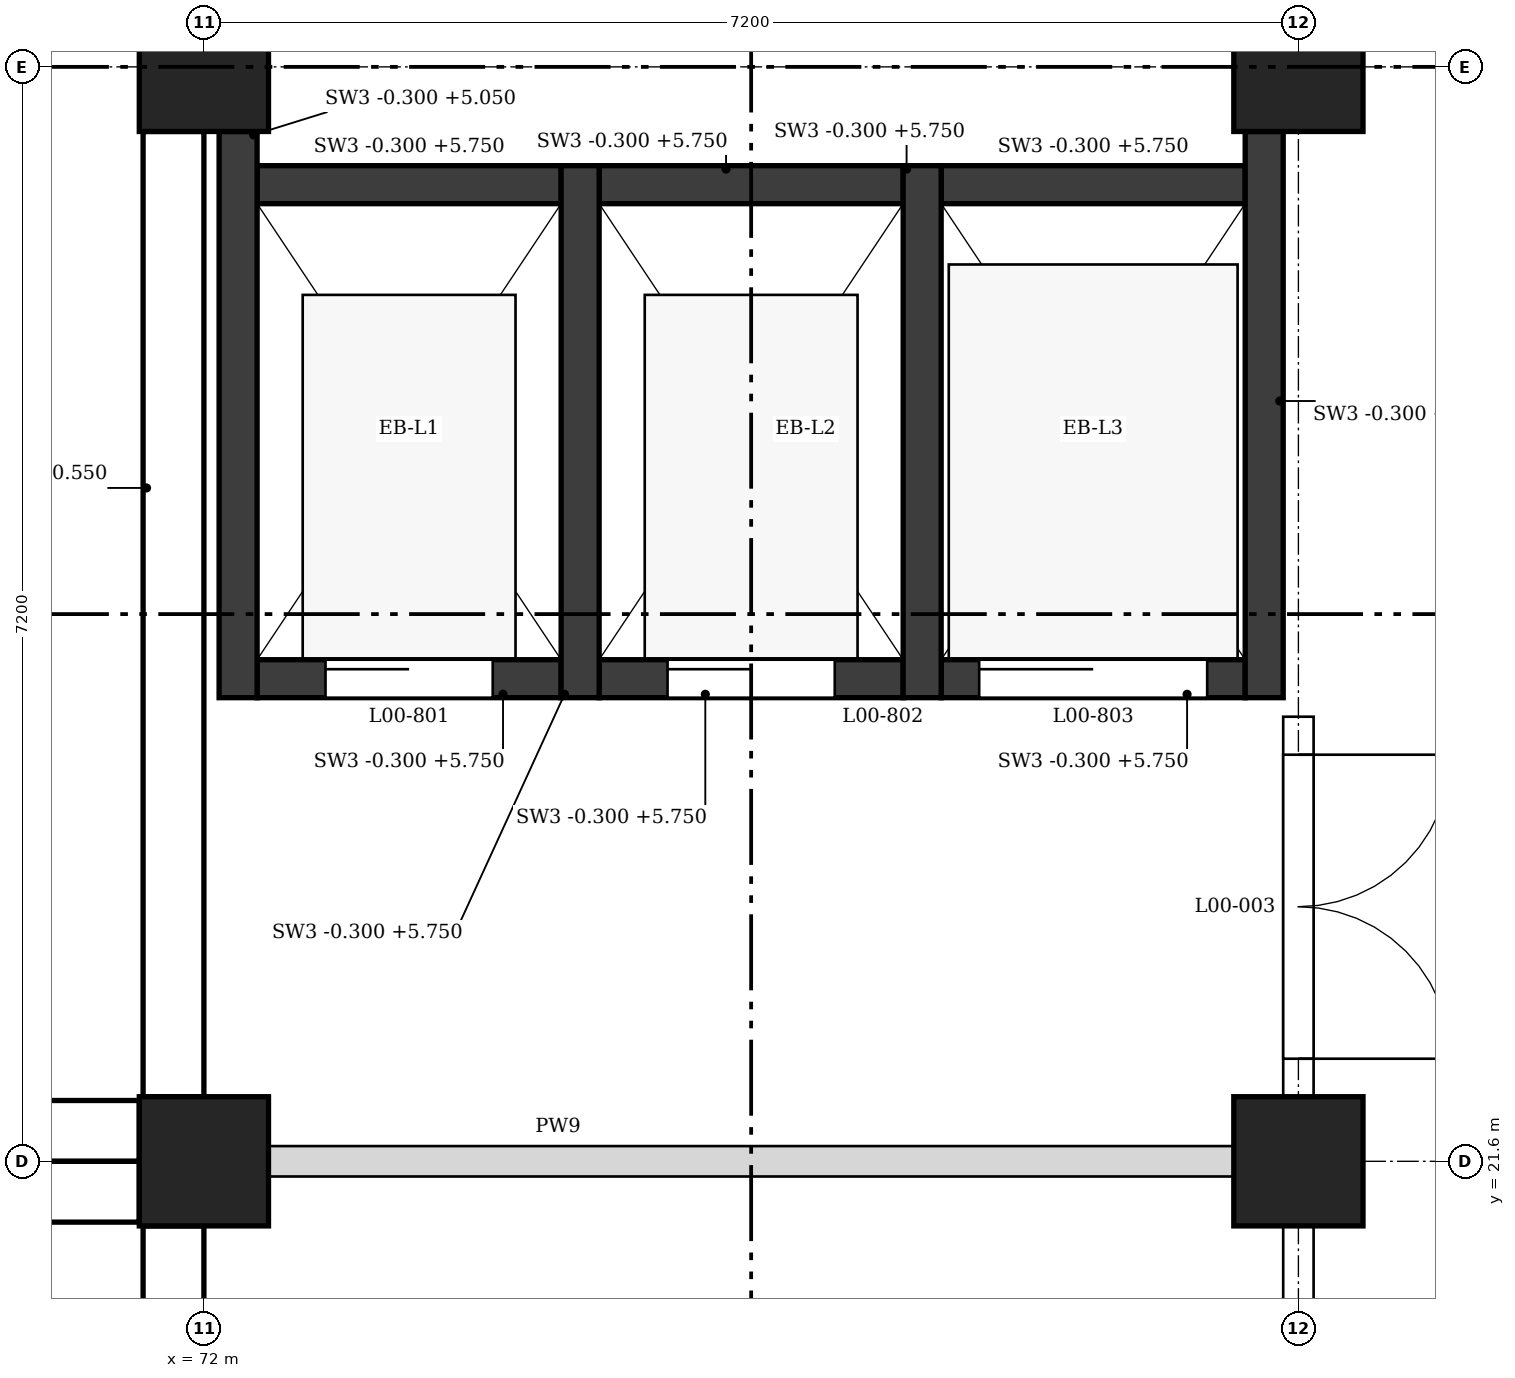
"""IFC4 building model, lengths in metres.
Left out: names, types, materials, properties, quantities, classifications, styles, units other than length and angle.
Written with IfcOpenShell. Run it as: python <this file> out.ifc"""

import sys

from ifc_helpers import new_model, si_unit, direction, frame, frame_2d, origin, origin_2d, place, context, subcontext, project, spatial, rectangle, extrude, element, fill, save


model = new_model("IFC4")
c1 = context("Model", 3, precision=1e-05, world=origin(), true_north=direction((0.0, 1.0)))
c2 = subcontext(c1, "Body", "Model", "MODEL_VIEW")
j1 = project(units=[si_unit("LENGTHUNIT", "METRE"), si_unit("PLANEANGLEUNIT", "RADIAN")], contexts=[c1])
p1 = place(None, origin())
s1 = spatial("IfcSite", under=j1, at=p1, CompositionType="ELEMENT")
p2 = place(p1, origin())
s2 = spatial("IfcBuilding", under=s1, at=p2, CompositionType="ELEMENT")
p3 = place(p2, origin())
s3 = spatial("IfcBuildingStorey", under=s2, at=p3, CompositionType="ELEMENT", Elevation=0.0)
for number, where, z_axis, x_axis in (
    (1, (72.0, 21.6, 0.0), (0.0, 0.0, 1.0), (1.0, 0.0, 0.0)),
    (2, (72.0, 28.8, 0.0), (0.0, 0.0, 1.0), (1.0, 0.0, 0.0)),
    (3, (79.2, 21.6, 0.0), (0.0, 0.0, 1.0), (1.0, 0.0, 0.0)),
    (4, (79.2, 28.8, 0.0), (0.0, 0.0, 1.0), (1.0, 0.0, 0.0)),
):
    element("IfcColumn", number, at=place(p3, frame(where, z_axis=z_axis, x_axis=x_axis)), inside=s3, PredefinedType="COLUMN", context=c2, shape_type="SweptSolid", body=[
        extrude(rectangle(XDim=0.85, YDim=0.85, at=origin_2d()), origin(), (0.0, 0.0, 1.0), 6.0),
    ])
p4 = place(p3, frame((72.225, 24.65, -0.3), z_axis=(0.0, 0.0, 1.0), x_axis=(0.0, 1.0, 0.0)))
e5 = element("IfcWall", 5, at=p4, inside=s3, PredefinedType="SHEAR", context=c2, shape_type="SweptSolid", body=[
    extrude(rectangle(XDim=3.725, YDim=0.25, at=frame_2d((1.863, 0.0))), origin(), (0.0, 0.0, 1.0), 5.35),
])
for number, where, z_axis, x_axis in (
    (6, (74.475, 24.65, -0.3), (0.0, 0.0, 1.0), (0.0, 1.0, 0.0)),
    (7, (76.725, 24.65, -0.3), (0.0, 0.0, 1.0), (0.0, 1.0, 0.0)),
):
    element("IfcWall", number, at=place(p3, frame(where, z_axis=z_axis, x_axis=x_axis)), inside=s3, PredefinedType="SHEAR", context=c2, shape_type="SweptSolid", body=[
        extrude(rectangle(XDim=3.5, YDim=0.25, at=frame_2d((1.75, 0.0))), origin(), (0.0, 0.0, 1.0), 6.05),
    ])
p5 = place(p3, frame((78.975, 24.65, -0.3), z_axis=(0.0, 0.0, 1.0), x_axis=(0.0, 1.0, 0.0)))
e8 = element("IfcWall", 8, at=p5, inside=s3, PredefinedType="SHEAR", context=c2, shape_type="SweptSolid", body=[
    extrude(rectangle(XDim=3.725, YDim=0.25, at=frame_2d((1.863, 0.0))), origin(), (0.0, 0.0, 1.0), 6.05),
])
p6 = place(p3, frame((72.35, 24.775, -0.3), z_axis=(0.0, 0.0, 1.0), x_axis=(1.0, 0.0, 0.0)))
e9 = element("IfcWall", 9, at=p6, inside=s3, PredefinedType="SHEAR", context=c2, shape_type="SweptSolid", body=[
    extrude(rectangle(XDim=2.0, YDim=0.25, at=frame_2d((1.0, 0.0))), origin(), (0.0, 0.0, 1.0), 6.05),
])
p7 = place(p6, frame((0.45, 0.0, 0.3)))
e10 = element("IfcOpeningElement", 10, at=p7, cuts=e9, PredefinedType="OPENING", context=c2, shape_type="SweptSolid", body=[
    extrude(rectangle(XDim=1.1, YDim=2.1, at=frame_2d((0.55, 1.05))), frame((0.0, 0.135, 0.0), z_axis=(0.0, -1.0, 0.0), x_axis=(1.0, 0.0, 0.0)), (0.0, 0.0, 1.0), 0.27),
])
p8 = place(p3, frame((72.35, 28.025, -0.3), z_axis=(0.0, 0.0, 1.0), x_axis=(1.0, 0.0, 0.0)))
e11 = element("IfcWall", 11, at=p8, inside=s3, PredefinedType="SHEAR", context=c2, shape_type="SweptSolid", body=[
    extrude(rectangle(XDim=2.0, YDim=0.25, at=frame_2d((1.0, 0.0))), origin(), (0.0, 0.0, 1.0), 6.05),
])
p9 = place(p3, frame((74.6, 24.775, -0.3), z_axis=(0.0, 0.0, 1.0), x_axis=(1.0, 0.0, 0.0)))
e12 = element("IfcWall", 12, at=p9, inside=s3, PredefinedType="SHEAR", context=c2, shape_type="SweptSolid", body=[
    extrude(rectangle(XDim=2.0, YDim=0.25, at=frame_2d((1.0, 0.0))), origin(), (0.0, 0.0, 1.0), 6.05),
])
p10 = place(p9, frame((0.45, 0.0, 0.3)))
e13 = element("IfcOpeningElement", 13, at=p10, cuts=e12, PredefinedType="OPENING", context=c2, shape_type="SweptSolid", body=[
    extrude(rectangle(XDim=1.1, YDim=2.1, at=frame_2d((0.55, 1.05))), frame((0.0, 0.135, 0.0), z_axis=(0.0, -1.0, 0.0), x_axis=(1.0, 0.0, 0.0)), (0.0, 0.0, 1.0), 0.27),
])
p11 = place(p3, frame((74.6, 28.025, -0.3), z_axis=(0.0, 0.0, 1.0), x_axis=(1.0, 0.0, 0.0)))
e14 = element("IfcWall", 14, at=p11, inside=s3, PredefinedType="SHEAR", context=c2, shape_type="SweptSolid", body=[
    extrude(rectangle(XDim=2.0, YDim=0.25, at=frame_2d((1.0, 0.0))), origin(), (0.0, 0.0, 1.0), 6.05),
])
p12 = place(p3, frame((76.85, 24.775, -0.3), z_axis=(0.0, 0.0, 1.0), x_axis=(1.0, 0.0, 0.0)))
e15 = element("IfcWall", 15, at=p12, inside=s3, PredefinedType="SHEAR", context=c2, shape_type="SweptSolid", body=[
    extrude(rectangle(XDim=2.0, YDim=0.25, at=frame_2d((1.0, 0.0))), origin(), (0.0, 0.0, 1.0), 6.05),
])
p13 = place(p12, frame((0.25, 0.0, 0.3)))
e16 = element("IfcOpeningElement", 16, at=p13, cuts=e15, PredefinedType="OPENING", context=c2, shape_type="SweptSolid", body=[
    extrude(rectangle(XDim=1.5, YDim=2.1, at=frame_2d((0.75, 1.05))), frame((0.0, 0.135, 0.0), z_axis=(0.0, -1.0, 0.0), x_axis=(1.0, 0.0, 0.0)), (0.0, 0.0, 1.0), 0.27),
])
p14 = place(p3, frame((76.85, 28.025, -0.3), z_axis=(0.0, 0.0, 1.0), x_axis=(1.0, 0.0, 0.0)))
e17 = element("IfcWall", 17, at=p14, inside=s3, PredefinedType="SHEAR", context=c2, shape_type="SweptSolid", body=[
    extrude(rectangle(XDim=2.0, YDim=0.25, at=frame_2d((1.0, 0.0))), origin(), (0.0, 0.0, 1.0), 6.05),
])
p15 = place(p3, frame((65.225, 21.4, 0.0), z_axis=(0.0, 0.0, 1.0), x_axis=(1.0, 0.0, 0.0)))
e18 = element("IfcWall", 18, at=p15, inside=s3, PredefinedType="SOLIDWALL", context=c2, shape_type="SweptSolid", body=[
    extrude(rectangle(XDim=6.35, YDim=0.4, at=frame_2d((3.175, 0.0))), origin(), (0.0, 0.0, 1.0), 10.7),
])
p16 = place(p3, frame((72.425, 21.6, 0.0), z_axis=(0.0, 0.0, 1.0), x_axis=(1.0, 0.0, 0.0)))
e19 = element("IfcWall", 19, at=p16, inside=s3, PredefinedType="PARTITIONING", context=c2, shape_type="SweptSolid", body=[
    extrude(rectangle(XDim=6.35, YDim=0.2, at=frame_2d((3.175, 0.0))), origin(), (0.0, 0.0, 1.0), 5.0),
])
p17 = place(p3, frame((65.225, 21.8, 0.0), z_axis=(0.0, 0.0, 1.0), x_axis=(1.0, 0.0, 0.0)))
e20 = element("IfcWall", 20, at=p17, inside=s3, PredefinedType="SOLIDWALL", context=c2, shape_type="SweptSolid", body=[
    extrude(rectangle(XDim=6.35, YDim=0.4, at=frame_2d((3.175, 0.0))), origin(), (0.0, 0.0, 1.0), 10.7),
])
for number, where, z_axis, x_axis in (
    (21, (71.8, 14.825, 0.0), (0.0, 0.0, 1.0), (0.0, 1.0, 0.0)),
    (22, (71.8, 22.025, 0.0), (0.0, 0.0, 1.0), (0.0, 1.0, 0.0)),
):
    element("IfcWall", number, at=place(p3, frame(where, z_axis=z_axis, x_axis=x_axis)), inside=s3, PredefinedType="SOLIDWALL", context=c2, shape_type="SweptSolid", body=[
        extrude(rectangle(XDim=6.35, YDim=0.4, at=frame_2d((3.175, 0.0))), origin(), (0.0, 0.0, 1.0), 10.55),
    ])
p18 = place(p3, frame((79.2, 14.825, 0.0), z_axis=(0.0, 0.0, 1.0), x_axis=(0.0, 1.0, 0.0)))
e23 = element("IfcWall", 23, at=p18, inside=s3, PredefinedType="PARTITIONING", context=c2, shape_type="SweptSolid", body=[
    extrude(rectangle(XDim=6.35, YDim=0.2, at=frame_2d((3.175, 0.0))), origin(), (0.0, 0.0, 1.0), 5.0),
])
p19 = place(p18, frame((2.175, 0.0, 0.0)))
e24 = element("IfcOpeningElement", 24, at=p19, cuts=e23, PredefinedType="OPENING", context=c2, shape_type="SweptSolid", body=[
    extrude(rectangle(XDim=2.0, YDim=2.1, at=frame_2d((1.0, 1.05))), frame((0.0, 0.11, 0.0), z_axis=(0.0, -1.0, 0.0), x_axis=(1.0, 0.0, 0.0)), (0.0, 0.0, 1.0), 0.22),
])
p20 = place(p3, frame((79.2, 22.025, 0.0), z_axis=(0.0, 0.0, 1.0), x_axis=(0.0, 1.0, 0.0)))
e25 = element("IfcWall", 25, at=p20, inside=s3, PredefinedType="PARTITIONING", context=c2, shape_type="SweptSolid", body=[
    extrude(rectangle(XDim=2.5, YDim=0.2, at=frame_2d((1.25, 0.0))), origin(), (0.0, 0.0, 1.0), 5.0),
])
p21 = place(p20, frame((0.25, 0.0, 0.0)))
e26 = element("IfcOpeningElement", 26, at=p21, cuts=e25, PredefinedType="OPENING", context=c2, shape_type="SweptSolid", body=[
    extrude(rectangle(XDim=2.0, YDim=2.4, at=frame_2d((1.0, 1.2))), frame((0.0, 0.11, 0.0), z_axis=(0.0, -1.0, 0.0), x_axis=(1.0, 0.0, 0.0)), (0.0, 0.0, 1.0), 0.22),
])
p22 = place(p7, origin())
e27 = element("IfcDoor", 27, at=p22, inside=s3, OperationType="SLIDING_TO_LEFT", PredefinedType="DOOR", context=c2, shape_type="SweptSolid", body=[
    extrude(rectangle(XDim=1.1, YDim=2.1, at=frame_2d((0.55, 1.05))), frame((0.0, 0.025, 0.0), z_axis=(0.0, -1.0, 0.0), x_axis=(1.0, 0.0, 0.0)), (0.0, 0.0, 1.0), 0.05),
])
fill(e10, e27)
p23 = place(p10, origin())
e28 = element("IfcDoor", 28, at=p23, inside=s3, OperationType="SLIDING_TO_LEFT", PredefinedType="DOOR", context=c2, shape_type="SweptSolid", body=[
    extrude(rectangle(XDim=1.1, YDim=2.1, at=frame_2d((0.55, 1.05))), frame((0.0, 0.025, 0.0), z_axis=(0.0, -1.0, 0.0), x_axis=(1.0, 0.0, 0.0)), (0.0, 0.0, 1.0), 0.05),
])
fill(e13, e28)
p24 = place(p13, origin())
e29 = element("IfcDoor", 29, at=p24, inside=s3, OperationType="SLIDING_TO_LEFT", PredefinedType="DOOR", context=c2, shape_type="SweptSolid", body=[
    extrude(rectangle(XDim=1.5, YDim=2.1, at=frame_2d((0.75, 1.05))), frame((0.0, 0.025, 0.0), z_axis=(0.0, -1.0, 0.0), x_axis=(1.0, 0.0, 0.0)), (0.0, 0.0, 1.0), 0.05),
])
fill(e16, e29)
p25 = place(p21, origin())
e30 = element("IfcDoor", 30, at=p25, inside=s3, OperationType="DOUBLE_DOOR_SINGLE_SWING", PredefinedType="DOOR", context=c2, shape_type="SweptSolid", body=[
    extrude(rectangle(XDim=2.0, YDim=2.4, at=frame_2d((1.0, 1.2))), frame((0.0, 0.025, 0.0), z_axis=(0.0, -1.0, 0.0), x_axis=(1.0, 0.0, 0.0)), (0.0, 0.0, 1.0), 0.05),
])
fill(e26, e30)
save(model, sys.argv[1])
